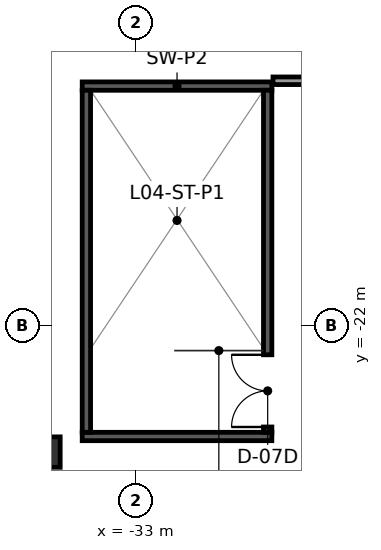
"""IFC4 building model, lengths in metres.
Left out: names, types, materials, properties, quantities, classifications, styles, units other than length and angle.
Written with IfcOpenShell. Run it as: python <this file> out.ifc"""

import sys

from ifc_helpers import new_model, si_unit, direction, frame, frame_2d, origin, origin_2d, place, context, subcontext, project, spatial, rectangle, hollow_rectangle, extrude, element, fill, save


model = new_model("IFC4")
c1 = context("Model", 3, precision=1e-05, world=origin(), true_north=direction((0.0, 1.0)))
c2 = subcontext(c1, "Body", "Model", "MODEL_VIEW")
j1 = project(units=[si_unit("LENGTHUNIT", "METRE"), si_unit("PLANEANGLEUNIT", "RADIAN")], contexts=[c1])
p1 = place(None, origin())
s1 = spatial("IfcSite", under=j1, at=p1, CompositionType="ELEMENT")
p2 = place(p1, origin())
s2 = spatial("IfcBuilding", under=s1, at=p2, CompositionType="ELEMENT")
p3 = place(p2, frame((0.0, 0.0, 23.5)))
s3 = spatial("IfcBuildingStorey", under=s2, at=p3, CompositionType="ELEMENT", Elevation=23.5)
p4 = place(p3, frame((-35.3, -25.32, 0.0), z_axis=(0.0, 0.0, 1.0), x_axis=(1.0, 0.0, 0.0)))
e1 = element("IfcColumn", 1, at=p4, inside=s3, PredefinedType="COLUMN", context=c2, shape_type="SweptSolid", body=[
    extrude(hollow_rectangle(XDim=0.6, YDim=0.8, WallThickness=0.05, at=origin_2d()), origin(), (0.0, 0.0, 1.0), 5.15),
])
for number, where, z_axis, x_axis in (
    (2, (-34.42, -24.91, 0.0), (0.0, 0.0, 1.0), (1.0, 0.0, 0.0)),
    (3, (-34.42, -15.69, 0.0), (0.0, 0.0, 1.0), (1.0, 0.0, 0.0)),
):
    element("IfcWall", number, at=place(p3, frame(where, z_axis=z_axis, x_axis=x_axis)), inside=s3, PredefinedType="SHEAR", context=c2, shape_type="SweptSolid", body=[
        extrude(rectangle(XDim=4.99, YDim=0.22, at=frame_2d((2.495, 0.0))), origin(), (0.0, 0.0, 1.0), 5.15),
    ])
p5 = place(p3, frame((-34.31, -24.8, 0.0), z_axis=(0.0, 0.0, 1.0), x_axis=(0.0, 1.0, 0.0)))
e4 = element("IfcWall", 4, at=p5, inside=s3, PredefinedType="SHEAR", context=c2, shape_type="SweptSolid", body=[
    extrude(rectangle(XDim=9.0, YDim=0.22, at=frame_2d((4.5, 0.0))), origin(), (0.0, 0.0, 1.0), 5.15),
])
p6 = place(p3, frame((-29.54, -24.8, 0.0), z_axis=(0.0, 0.0, 1.0), x_axis=(0.0, 1.0, 0.0)))
e5 = element("IfcWall", 5, at=p6, inside=s3, PredefinedType="SHEAR", context=c2, shape_type="SweptSolid", body=[
    extrude(rectangle(XDim=9.0, YDim=0.22, at=frame_2d((4.5, 0.0))), origin(), (0.0, 0.0, 1.0), 5.15),
])
p7 = place(p6, frame((0.14, 0.0, 0.0)))
e6 = element("IfcOpeningElement", 6, at=p7, cuts=e5, PredefinedType="OPENING", context=c2, shape_type="SweptSolid", body=[
    extrude(rectangle(XDim=1.9, YDim=2.2, at=frame_2d((0.95, 1.1))), frame((0.0, 0.12, 0.0), z_axis=(0.0, -1.0, 0.0), x_axis=(1.0, 0.0, 0.0)), (0.0, 0.0, 1.0), 0.24),
])
p8 = place(p3, frame((-29.4, -15.55, 0.0), z_axis=(0.0, 0.0, 1.0), x_axis=(1.0, 0.0, 0.0)))
e7 = element("IfcWall", 7, at=p8, inside=s3, PredefinedType="PARTITIONING", context=c2, shape_type="SweptSolid", body=[
    extrude(rectangle(XDim=18.75, YDim=0.2, at=frame_2d((9.375, 0.0))), origin(), (0.0, 0.0, 1.0), 5.15),
])
p9 = place(p8, frame((8.475, 0.0, 0.0)))
e8 = element("IfcOpeningElement", 8, at=p9, cuts=e7, PredefinedType="OPENING", context=c2, shape_type="SweptSolid", body=[
    extrude(rectangle(XDim=1.8, YDim=2.2, at=frame_2d((0.9, 1.1))), frame((0.0, 0.11, 0.0), z_axis=(0.0, -1.0, 0.0), x_axis=(1.0, 0.0, 0.0)), (0.0, 0.0, 1.0), 0.22),
])
p10 = place(p7, origin())
e9 = element("IfcDoor", 9, at=p10, inside=s3, OperationType="DOUBLE_DOOR_SINGLE_SWING", PredefinedType="DOOR", context=c2, shape_type="SweptSolid", body=[
    extrude(rectangle(XDim=1.9, YDim=2.2, at=frame_2d((0.95, 1.1))), frame((0.0, 0.025, 0.0), z_axis=(0.0, -1.0, 0.0), x_axis=(1.0, 0.0, 0.0)), (0.0, 0.0, 1.0), 0.05),
])
fill(e6, e9)
save(model, sys.argv[1])
